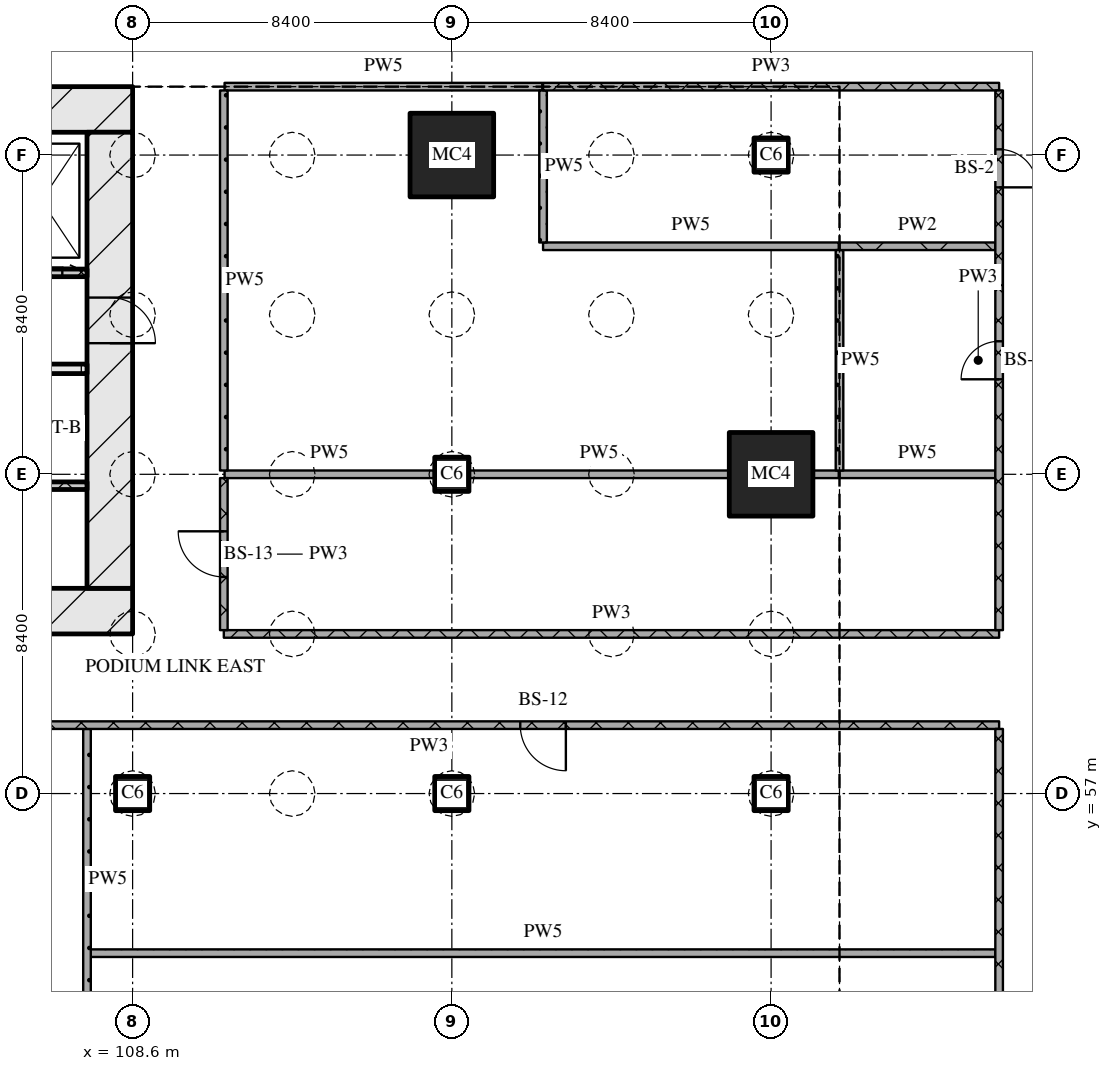
"""IFC4 building model, lengths in metres.
Left out: names, types, materials, properties, quantities, classifications, styles, units other than length and angle.
Written with IfcOpenShell. Run it as: python <this file> out.ifc"""

import sys

from ifc_helpers import new_model, si_unit, direction, frame, frame_2d, origin, origin_2d, place, context, subcontext, project, spatial, rectangle, extrude, element, fill, save


model = new_model("IFC4")
c1 = context("Model", 3, precision=1e-05, world=origin(), true_north=direction((0.0, 1.0)))
c2 = subcontext(c1, "Body", "Model", "MODEL_VIEW")
j1 = project(units=[si_unit("LENGTHUNIT", "METRE"), si_unit("PLANEANGLEUNIT", "RADIAN")], contexts=[c1])
p1 = place(None, origin())
s1 = spatial("IfcSite", under=j1, at=p1, CompositionType="ELEMENT")
p2 = place(p1, origin())
s2 = spatial("IfcBuilding", under=s1, at=p2, CompositionType="ELEMENT")
p3 = place(p2, frame((0.0, 0.0, -6.0)))
s3 = spatial("IfcBuildingStorey", under=s2, at=p3, CompositionType="ELEMENT", Elevation=-6.0)
for number, where, z_axis, x_axis in (
    (1, (108.6, 57.0, 0.0), (0.0, 0.0, 1.0), (1.0, 0.0, 0.0)),
    (2, (117.0, 57.0, 0.0), (0.0, 0.0, 1.0), (1.0, 0.0, 0.0)),
    (3, (117.0, 65.4, 0.0), (0.0, 0.0, 1.0), (1.0, 0.0, 0.0)),
):
    element("IfcColumn", number, at=place(p3, frame(where, z_axis=z_axis, x_axis=x_axis)), inside=s3, PredefinedType="COLUMN", context=c2, shape_type="SweptSolid", body=[
        extrude(rectangle(XDim=0.9, YDim=0.9, at=origin_2d()), origin(), (0.0, 0.0, 1.0), 6.0),
    ])
p4 = place(p3, frame((117.0, 73.8, 0.0), z_axis=(0.0, 0.0, 1.0), x_axis=(1.0, 0.0, 0.0)))
e4 = element("IfcColumn", 4, at=p4, inside=s3, PredefinedType="COLUMN", context=c2, shape_type="SweptSolid", body=[
    extrude(rectangle(XDim=2.2, YDim=2.2, at=origin_2d()), origin(), (0.0, 0.0, 1.0), 6.0),
])
p5 = place(p3, frame((125.4, 57.0, 0.0), z_axis=(0.0, 0.0, 1.0), x_axis=(1.0, 0.0, 0.0)))
e5 = element("IfcColumn", 5, at=p5, inside=s3, PredefinedType="COLUMN", context=c2, shape_type="SweptSolid", body=[
    extrude(rectangle(XDim=0.9, YDim=0.9, at=origin_2d()), origin(), (0.0, 0.0, 1.0), 6.0),
])
p6 = place(p3, frame((125.4, 65.4, 0.0), z_axis=(0.0, 0.0, 1.0), x_axis=(1.0, 0.0, 0.0)))
e6 = element("IfcColumn", 6, at=p6, inside=s3, PredefinedType="COLUMN", context=c2, shape_type="SweptSolid", body=[
    extrude(rectangle(XDim=2.2, YDim=2.2, at=origin_2d()), origin(), (0.0, 0.0, 1.0), 6.0),
])
p7 = place(p3, frame((125.4, 73.8, 0.0), z_axis=(0.0, 0.0, 1.0), x_axis=(1.0, 0.0, 0.0)))
e7 = element("IfcColumn", 7, at=p7, inside=s3, PredefinedType="COLUMN", context=c2, shape_type="SweptSolid", body=[
    extrude(rectangle(XDim=0.9, YDim=0.9, at=origin_2d()), origin(), (0.0, 0.0, 1.0), 6.0),
])
p8 = place(p3, frame((66.6, 61.8, 0.0), z_axis=(0.0, 0.0, 1.0), x_axis=(1.0, 0.0, 0.0)))
e8 = element("IfcWall", 8, at=p8, inside=s3, PredefinedType="SOLIDWALL", context=c2, shape_type="SweptSolid", body=[
    extrude(rectangle(XDim=42.0, YDim=1.2, at=frame_2d((21.0, 0.0))), origin(), (0.0, 0.0, 1.0), 5.7),
])
p9 = place(p8, frame((21.35, 0.0, 0.0)))
e9 = element("IfcOpeningElement", 9, at=p9, cuts=e8, PredefinedType="OPENING", context=c2, shape_type="SweptSolid", body=[
    extrude(rectangle(XDim=1.8, YDim=2.1, at=frame_2d((0.9, 1.05))), frame((0.0, 0.61, 0.0), z_axis=(0.0, -1.0, 0.0), x_axis=(1.0, 0.0, 0.0)), (0.0, 0.0, 1.0), 1.22),
])
p10 = place(p3, frame((66.6, 75.0, 0.0), z_axis=(0.0, 0.0, 1.0), x_axis=(1.0, 0.0, 0.0)))
e10 = element("IfcWall", 10, at=p10, inside=s3, PredefinedType="SOLIDWALL", context=c2, shape_type="SweptSolid", body=[
    extrude(rectangle(XDim=42.0, YDim=1.2, at=frame_2d((21.0, 0.0))), origin(), (0.0, 0.0, 1.0), 5.7),
])
p11 = place(p3, frame((108.0, 62.4, 0.0), z_axis=(0.0, 0.0, 1.0), x_axis=(0.0, 1.0, 0.0)))
e11 = element("IfcWall", 11, at=p11, inside=s3, PredefinedType="SOLIDWALL", context=c2, shape_type="SweptSolid", body=[
    extrude(rectangle(XDim=12.0, YDim=1.2, at=frame_2d((6.0, 0.0))), origin(), (0.0, 0.0, 1.0), 5.7),
])
p12 = place(p11, frame((6.45, 0.0, 0.0)))
e12 = element("IfcOpeningElement", 12, at=p12, cuts=e11, PredefinedType="OPENING", context=c2, shape_type="SweptSolid", body=[
    extrude(rectangle(XDim=1.2, YDim=2.1, at=frame_2d((0.6, 1.05))), frame((0.0, 0.61, 0.0), z_axis=(0.0, -1.0, 0.0), x_axis=(1.0, 0.0, 0.0)), (0.0, 0.0, 1.0), 1.22),
])
p13 = place(p3, frame((91.4, 65.1, 0.0), z_axis=(0.0, 0.0, 1.0), x_axis=(1.0, 0.0, 0.0)))
e13 = element("IfcWall", 13, at=p13, inside=s3, PredefinedType="SOLIDWALL", context=c2, shape_type="SweptSolid", body=[
    extrude(rectangle(XDim=16.0, YDim=0.2, at=frame_2d((8.0, 0.0))), origin(), (0.0, 0.0, 1.0), 5.7),
])
p14 = place(p13, frame((7.83, 0.0, 0.0)))
e14 = element("IfcOpeningElement", 14, at=p14, cuts=e13, PredefinedType="OPENING", context=c2, shape_type="SweptSolid", body=[
    extrude(rectangle(XDim=0.9, YDim=2.1, at=frame_2d((0.45, 1.05))), frame((0.0, 0.11, 0.0), z_axis=(0.0, -1.0, 0.0), x_axis=(1.0, 0.0, 0.0)), (0.0, 0.0, 1.0), 0.22),
])
p15 = place(p3, frame((98.95, 68.175, 0.0), z_axis=(0.0, 0.0, 1.0), x_axis=(1.0, 0.0, 0.0)))
e15 = element("IfcWall", 15, at=p15, inside=s3, PredefinedType="SOLIDWALL", context=c2, shape_type="SweptSolid", body=[
    extrude(rectangle(XDim=8.45, YDim=0.25, at=frame_2d((4.225, 0.0))), origin(), (0.0, 0.0, 1.0), 5.7),
])
p16 = place(p15, frame((0.45, 0.0, 0.0)))
e16 = element("IfcOpeningElement", 16, at=p16, cuts=e15, PredefinedType="OPENING", context=c2, shape_type="SweptSolid", body=[
    extrude(rectangle(XDim=0.8, YDim=2.1, at=frame_2d((0.4, 1.05))), frame((0.0, 0.135, 0.0), z_axis=(0.0, -1.0, 0.0), x_axis=(1.0, 0.0, 0.0)), (0.0, 0.0, 1.0), 0.27),
])
p17 = place(p15, frame((1.75, 0.0, 0.0)))
e17 = element("IfcOpeningElement", 17, at=p17, cuts=e15, PredefinedType="OPENING", context=c2, shape_type="SweptSolid", body=[
    extrude(rectangle(XDim=1.0, YDim=2.1, at=frame_2d((0.5, 1.05))), frame((0.0, 0.135, 0.0), z_axis=(0.0, -1.0, 0.0), x_axis=(1.0, 0.0, 0.0)), (0.0, 0.0, 1.0), 0.27),
])
p18 = place(p3, frame((67.8, 70.7, 0.0), z_axis=(0.0, 0.0, 1.0), x_axis=(1.0, 0.0, 0.0)))
e18 = element("IfcWall", 18, at=p18, inside=s3, PredefinedType="SOLIDWALL", context=c2, shape_type="SweptSolid", body=[
    extrude(rectangle(XDim=39.6, YDim=0.2, at=frame_2d((19.8, 0.0))), origin(), (0.0, 0.0, 1.0), 5.7),
])
p19 = place(p18, frame((0.65, 0.0, 0.0)))
e19 = element("IfcOpeningElement", 19, at=p19, cuts=e18, PredefinedType="OPENING", context=c2, shape_type="SweptSolid", body=[
    extrude(rectangle(XDim=1.1, YDim=2.1, at=frame_2d((0.55, 1.05))), frame((0.0, 0.11, 0.0), z_axis=(0.0, -1.0, 0.0), x_axis=(1.0, 0.0, 0.0)), (0.0, 0.0, 1.0), 0.22),
])
p20 = place(p18, frame((3.25, 0.0, 0.0)))
e20 = element("IfcOpeningElement", 20, at=p20, cuts=e18, PredefinedType="OPENING", context=c2, shape_type="SweptSolid", body=[
    extrude(rectangle(XDim=1.1, YDim=2.1, at=frame_2d((0.55, 1.05))), frame((0.0, 0.11, 0.0), z_axis=(0.0, -1.0, 0.0), x_axis=(1.0, 0.0, 0.0)), (0.0, 0.0, 1.0), 0.22),
])
p21 = place(p18, frame((5.9, 0.0, 0.0)))
e21 = element("IfcOpeningElement", 21, at=p21, cuts=e18, PredefinedType="OPENING", context=c2, shape_type="SweptSolid", body=[
    extrude(rectangle(XDim=1.0, YDim=2.1, at=frame_2d((0.5, 1.05))), frame((0.0, 0.11, 0.0), z_axis=(0.0, -1.0, 0.0), x_axis=(1.0, 0.0, 0.0)), (0.0, 0.0, 1.0), 0.22),
])
p22 = place(p18, frame((21.7, 0.0, 0.0)))
e22 = element("IfcOpeningElement", 22, at=p22, cuts=e18, PredefinedType="OPENING", context=c2, shape_type="SweptSolid", body=[
    extrude(rectangle(XDim=1.0, YDim=2.1, at=frame_2d((0.5, 1.05))), frame((0.0, 0.11, 0.0), z_axis=(0.0, -1.0, 0.0), x_axis=(1.0, 0.0, 0.0)), (0.0, 0.0, 1.0), 0.22),
])
p23 = place(p18, frame((32.7, 0.0, 0.0)))
e23 = element("IfcOpeningElement", 23, at=p23, cuts=e18, PredefinedType="OPENING", context=c2, shape_type="SweptSolid", body=[
    extrude(rectangle(XDim=1.0, YDim=2.1, at=frame_2d((0.5, 1.05))), frame((0.0, 0.11, 0.0), z_axis=(0.0, -1.0, 0.0), x_axis=(1.0, 0.0, 0.0)), (0.0, 0.0, 1.0), 0.22),
])
p24 = place(p18, frame((35.25, 0.0, 0.0)))
e24 = element("IfcOpeningElement", 24, at=p24, cuts=e18, PredefinedType="OPENING", context=c2, shape_type="SweptSolid", body=[
    extrude(rectangle(XDim=1.1, YDim=2.1, at=frame_2d((0.55, 1.05))), frame((0.0, 0.11, 0.0), z_axis=(0.0, -1.0, 0.0), x_axis=(1.0, 0.0, 0.0)), (0.0, 0.0, 1.0), 0.22),
])
p25 = place(p18, frame((37.85, 0.0, 0.0)))
e25 = element("IfcOpeningElement", 25, at=p25, cuts=e18, PredefinedType="OPENING", context=c2, shape_type="SweptSolid", body=[
    extrude(rectangle(XDim=1.1, YDim=2.1, at=frame_2d((0.55, 1.05))), frame((0.0, 0.11, 0.0), z_axis=(0.0, -1.0, 0.0), x_axis=(1.0, 0.0, 0.0)), (0.0, 0.0, 1.0), 0.22),
])
p26 = place(p3, frame((107.5, 52.8, 0.0), z_axis=(0.0, 0.0, 1.0), x_axis=(1.0, 0.0, 0.0)))
e26 = element("IfcWall", 26, at=p26, inside=s3, PredefinedType="PARTITIONING", context=c2, shape_type="SweptSolid", body=[
    extrude(rectangle(XDim=23.8, YDim=0.2, at=frame_2d((11.9, 0.0))), origin(), (0.0, 0.0, 1.0), 5.7),
])
p27 = place(p3, frame((131.4, 58.8, 0.0), z_axis=(0.0, 0.0, 1.0), x_axis=(-1.0, 0.0, 0.0)))
e27 = element("IfcWall", 27, at=p27, inside=s3, PredefinedType="PARTITIONING", context=c2, shape_type="SweptSolid", body=[
    extrude(rectangle(XDim=30.0, YDim=0.2, at=frame_2d((15.0, 0.0))), origin(), (0.0, 0.0, 1.0), 5.7),
])
p28 = place(p27, frame((11.4, 0.0, 0.0)))
e28 = element("IfcOpeningElement", 28, at=p28, cuts=e27, PredefinedType="OPENING", context=c2, shape_type="SweptSolid", body=[
    extrude(rectangle(XDim=1.2, YDim=2.1, at=frame_2d((0.6, 1.05))), frame((0.0, 0.11, 0.0), z_axis=(0.0, -1.0, 0.0), x_axis=(1.0, 0.0, 0.0)), (0.0, 0.0, 1.0), 0.22),
])
p29 = place(p3, frame((111.0, 61.2, 0.0), z_axis=(0.0, 0.0, 1.0), x_axis=(1.0, 0.0, 0.0)))
e29 = element("IfcWall", 29, at=p29, inside=s3, PredefinedType="PARTITIONING", context=c2, shape_type="SweptSolid", body=[
    extrude(rectangle(XDim=20.4, YDim=0.2, at=frame_2d((10.2, 0.0))), origin(), (0.0, 0.0, 1.0), 5.7),
])
p30 = place(p3, frame((111.02, 65.4, 0.0), z_axis=(0.0, 0.0, 1.0), x_axis=(1.0, 0.0, 0.0)))
e30 = element("IfcWall", 30, at=p30, inside=s3, PredefinedType="PARTITIONING", context=c2, shape_type="SweptSolid", body=[
    extrude(rectangle(XDim=5.51, YDim=0.2, at=frame_2d((2.755, 0.0))), origin(), (0.0, 0.0, 1.0), 5.1),
])
p31 = place(p3, frame((117.47, 65.4, 0.0), z_axis=(0.0, 0.0, 1.0), x_axis=(1.0, 0.0, 0.0)))
e31 = element("IfcWall", 31, at=p31, inside=s3, PredefinedType="PARTITIONING", context=c2, shape_type="SweptSolid", body=[
    extrude(rectangle(XDim=6.81, YDim=0.2, at=frame_2d((3.405, 0.0))), origin(), (0.0, 0.0, 1.0), 5.7),
])
p32 = place(p3, frame((126.52, 65.4, 0.0), z_axis=(0.0, 0.0, 1.0), x_axis=(1.0, 0.0, 0.0)))
e32 = element("IfcWall", 32, at=p32, inside=s3, PredefinedType="PARTITIONING", context=c2, shape_type="SweptSolid", body=[
    extrude(rectangle(XDim=0.66, YDim=0.2, at=frame_2d((0.33, 0.0))), origin(), (0.0, 0.0, 1.0), 4.71),
])
p33 = place(p3, frame((127.2, 65.4, 0.0), z_axis=(0.0, 0.0, 1.0), x_axis=(1.0, 0.0, 0.0)))
e33 = element("IfcWall", 33, at=p33, inside=s3, PredefinedType="PARTITIONING", context=c2, shape_type="SweptSolid", body=[
    extrude(rectangle(XDim=4.1, YDim=0.2, at=frame_2d((2.05, 0.0))), origin(), (0.0, 0.0, 1.0), 4.71),
])
p34 = place(p3, frame((127.2, 71.4, 0.0), z_axis=(0.0, 0.0, 1.0), x_axis=(1.0, 0.0, 0.0)))
e34 = element("IfcWall", 34, at=p34, inside=s3, PredefinedType="PARTITIONING", context=c2, shape_type="SweptSolid", body=[
    extrude(rectangle(XDim=4.1, YDim=0.2, at=frame_2d((2.05, 0.0))), origin(), (0.0, 0.0, 1.0), 5.7),
])
p35 = place(p3, frame((119.4, 71.4, 0.0), z_axis=(0.0, 0.0, 1.0), x_axis=(1.0, 0.0, 0.0)))
e35 = element("IfcWall", 35, at=p35, inside=s3, PredefinedType="PARTITIONING", context=c2, shape_type="SweptSolid", body=[
    extrude(rectangle(XDim=7.78, YDim=0.2, at=frame_2d((3.89, 0.0))), origin(), (0.0, 0.0, 1.0), 5.7),
])
p36 = place(p3, frame((119.4, 75.6, 0.0), z_axis=(0.0, 0.0, 1.0), x_axis=(1.0, 0.0, 0.0)))
e36 = element("IfcWall", 36, at=p36, inside=s3, PredefinedType="PARTITIONING", context=c2, shape_type="SweptSolid", body=[
    extrude(rectangle(XDim=12.0, YDim=0.2, at=frame_2d((6.0, 0.0))), origin(), (0.0, 0.0, 1.0), 5.7),
])
p37 = place(p3, frame((111.02, 75.6, 0.0), z_axis=(0.0, 0.0, 1.0), x_axis=(1.0, 0.0, 0.0)))
e37 = element("IfcWall", 37, at=p37, inside=s3, PredefinedType="PARTITIONING", context=c2, shape_type="SweptSolid", body=[
    extrude(rectangle(XDim=8.36, YDim=0.2, at=frame_2d((4.18, 0.0))), origin(), (0.0, 0.0, 1.0), 5.7),
])
p38 = place(p3, frame((107.4, 58.7, 0.0), z_axis=(0.0, 0.0, 1.0), x_axis=(0.0, -1.0, 0.0)))
e38 = element("IfcWall", 38, at=p38, inside=s3, PredefinedType="PARTITIONING", context=c2, shape_type="SweptSolid", body=[
    extrude(rectangle(XDim=7.9, YDim=0.2, at=frame_2d((3.95, 0.0))), origin(), (0.0, 0.0, 1.0), 5.7),
])
p39 = place(p3, frame((111.0, 65.3, 0.0), z_axis=(0.0, 0.0, 1.0), x_axis=(0.0, -1.0, 0.0)))
e39 = element("IfcWall", 39, at=p39, inside=s3, PredefinedType="PARTITIONING", context=c2, shape_type="SweptSolid", body=[
    extrude(rectangle(XDim=4.0, YDim=0.2, at=frame_2d((2.0, 0.0))), origin(), (0.0, 0.0, 1.0), 5.7),
])
p40 = place(p39, frame((1.4, 0.0, 0.0)))
e40 = element("IfcOpeningElement", 40, at=p40, cuts=e39, PredefinedType="OPENING", context=c2, shape_type="SweptSolid", body=[
    extrude(rectangle(XDim=1.2, YDim=2.1, at=frame_2d((0.6, 1.05))), frame((0.0, 0.11, 0.0), z_axis=(0.0, -1.0, 0.0), x_axis=(1.0, 0.0, 0.0)), (0.0, 0.0, 1.0), 0.22),
])
p41 = place(p3, frame((111.0, 75.5, 0.0), z_axis=(0.0, 0.0, 1.0), x_axis=(0.0, -1.0, 0.0)))
e41 = element("IfcWall", 41, at=p41, inside=s3, PredefinedType="PARTITIONING", context=c2, shape_type="SweptSolid", body=[
    extrude(rectangle(XDim=10.0, YDim=0.2, at=frame_2d((5.0, 0.0))), origin(), (0.0, 0.0, 1.0), 5.7),
])
p42 = place(p3, frame((119.4, 75.5, 0.0), z_axis=(0.0, 0.0, 1.0), x_axis=(0.0, -1.0, 0.0)))
e42 = element("IfcWall", 42, at=p42, inside=s3, PredefinedType="PARTITIONING", context=c2, shape_type="SweptSolid", body=[
    extrude(rectangle(XDim=4.0, YDim=0.2, at=frame_2d((2.0, 0.0))), origin(), (0.0, 0.0, 1.0), 5.7),
])
p43 = place(p3, frame((127.2, 71.3, 0.0), z_axis=(0.0, 0.0, 1.0), x_axis=(0.0, -1.0, 0.0)))
e43 = element("IfcWall", 43, at=p43, inside=s3, PredefinedType="PARTITIONING", context=c2, shape_type="SweptSolid", body=[
    extrude(rectangle(XDim=5.8, YDim=0.2, at=frame_2d((2.9, 0.0))), origin(), (0.0, 0.0, 1.0), 5.7),
])
p44 = place(p3, frame((131.4, 58.7, 0.0), z_axis=(0.0, 0.0, 1.0), x_axis=(0.0, -1.0, 0.0)))
e44 = element("IfcWall", 44, at=p44, inside=s3, PredefinedType="PARTITIONING", context=c2, shape_type="SweptSolid", body=[
    extrude(rectangle(XDim=24.4, YDim=0.2, at=frame_2d((12.2, 0.0))), origin(), (0.0, 0.0, 1.0), 5.2),
])
p45 = place(p3, frame((131.4, 61.3, 0.0), z_axis=(0.0, 0.0, 1.0), x_axis=(0.0, 1.0, 0.0)))
e45 = element("IfcWall", 45, at=p45, inside=s3, PredefinedType="PARTITIONING", context=c2, shape_type="SweptSolid", body=[
    extrude(rectangle(XDim=14.2, YDim=0.2, at=frame_2d((7.1, 0.0))), origin(), (0.0, 0.0, 1.0), 4.8),
])
p46 = place(p45, frame((6.6, 0.0, 0.0)))
e46 = element("IfcOpeningElement", 46, at=p46, cuts=e45, PredefinedType="OPENING", context=c2, shape_type="SweptSolid", body=[
    extrude(rectangle(XDim=1.0, YDim=2.1, at=frame_2d((0.5, 1.05))), frame((0.0, 0.11, 0.0), z_axis=(0.0, -1.0, 0.0), x_axis=(1.0, 0.0, 0.0)), (0.0, 0.0, 1.0), 0.22),
])
p47 = place(p45, frame((11.65, 0.0, 0.0)))
e47 = element("IfcOpeningElement", 47, at=p47, cuts=e45, PredefinedType="OPENING", context=c2, shape_type="SweptSolid", body=[
    extrude(rectangle(XDim=1.0, YDim=2.1, at=frame_2d((0.5, 1.05))), frame((0.0, 0.11, 0.0), z_axis=(0.0, -1.0, 0.0), x_axis=(1.0, 0.0, 0.0)), (0.0, 0.0, 1.0), 0.22),
])
p48 = place(p12, origin())
e48 = element("IfcDoor", 48, at=p48, inside=s3, OperationType="SINGLE_SWING_RIGHT", PredefinedType="DOOR", context=c2, shape_type="SweptSolid", body=[
    extrude(rectangle(XDim=1.2, YDim=2.1, at=frame_2d((0.6, 1.05))), frame((0.0, 0.025, 0.0), z_axis=(0.0, -1.0, 0.0), x_axis=(1.0, 0.0, 0.0)), (0.0, 0.0, 1.0), 0.05),
])
fill(e12, e48)
p49 = place(p25, origin())
e49 = element("IfcDoor", 49, at=p49, inside=s3, OperationType="SLIDING_TO_RIGHT", PredefinedType="DOOR", context=c2, shape_type="SweptSolid", body=[
    extrude(rectangle(XDim=1.1, YDim=2.1, at=frame_2d((0.55, 1.05))), frame((0.0, 0.025, 0.0), z_axis=(0.0, -1.0, 0.0), x_axis=(1.0, 0.0, 0.0)), (0.0, 0.0, 1.0), 0.05),
])
fill(e25, e49)
p50 = place(p28, origin())
e50 = element("IfcDoor", 50, at=p50, inside=s3, OperationType="SINGLE_SWING_LEFT", PredefinedType="DOOR", context=c2, shape_type="SweptSolid", body=[
    extrude(rectangle(XDim=1.2, YDim=2.1, at=frame_2d((0.6, 1.05))), frame((0.0, 0.025, 0.0), z_axis=(0.0, -1.0, 0.0), x_axis=(1.0, 0.0, 0.0)), (0.0, 0.0, 1.0), 0.05),
])
fill(e28, e50)
p51 = place(p40, origin())
e51 = element("IfcDoor", 51, at=p51, inside=s3, OperationType="SINGLE_SWING_RIGHT", PredefinedType="DOOR", context=c2, shape_type="SweptSolid", body=[
    extrude(rectangle(XDim=1.2, YDim=2.1, at=frame_2d((0.6, 1.05))), frame((0.0, 0.025, 0.0), z_axis=(0.0, -1.0, 0.0), x_axis=(1.0, 0.0, 0.0)), (0.0, 0.0, 1.0), 0.05),
])
fill(e40, e51)
p52 = place(p46, origin())
e52 = element("IfcDoor", 52, at=p52, inside=s3, OperationType="SINGLE_SWING_LEFT", PredefinedType="DOOR", context=c2, shape_type="SweptSolid", body=[
    extrude(rectangle(XDim=1.0, YDim=2.1, at=frame_2d((0.5, 1.05))), frame((0.0, 0.025, 0.0), z_axis=(0.0, -1.0, 0.0), x_axis=(1.0, 0.0, 0.0)), (0.0, 0.0, 1.0), 0.05),
])
fill(e46, e52)
p53 = place(p47, origin())
e53 = element("IfcDoor", 53, at=p53, inside=s3, OperationType="SINGLE_SWING_RIGHT", PredefinedType="DOOR", context=c2, shape_type="SweptSolid", body=[
    extrude(rectangle(XDim=1.0, YDim=2.1, at=frame_2d((0.5, 1.05))), frame((0.0, 0.025, 0.0), z_axis=(0.0, -1.0, 0.0), x_axis=(1.0, 0.0, 0.0)), (0.0, 0.0, 1.0), 0.05),
])
fill(e47, e53)
save(model, sys.argv[1])
